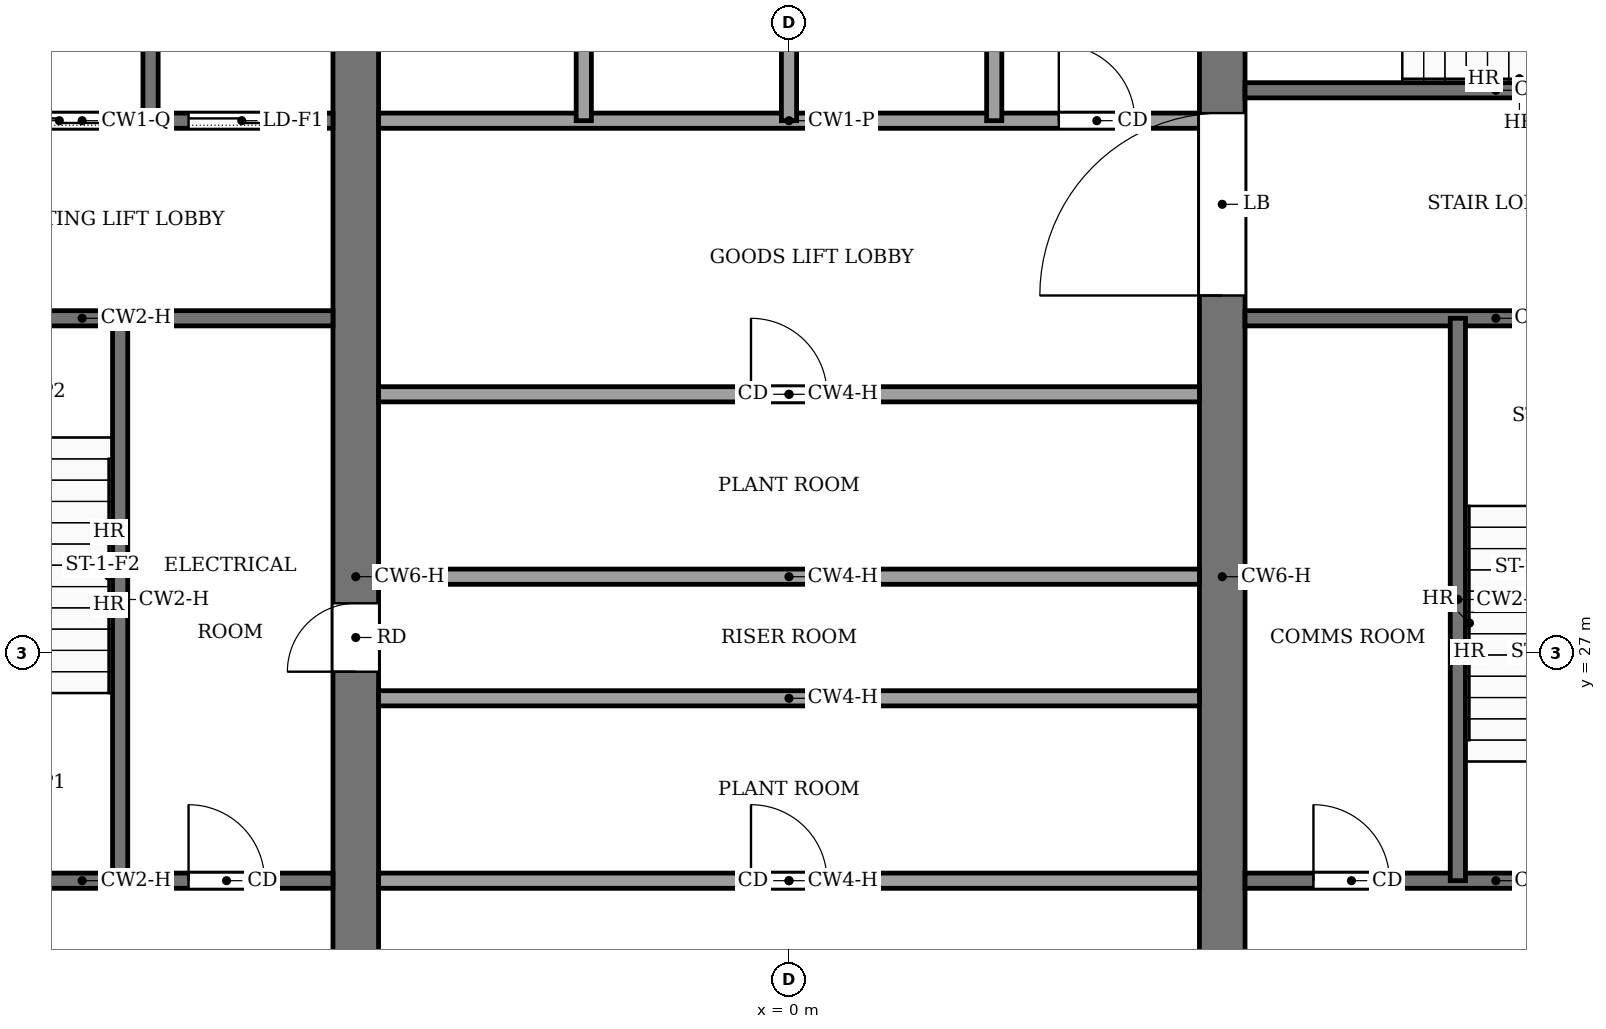
"""IFC4 building model, lengths in metres.
Left out: names, types, materials, properties, quantities, classifications, styles, units other than length and angle.
Written with IfcOpenShell. Run it as: python <this file> out.ifc"""

import sys

from ifc_helpers import new_model, si_unit, direction, frame, frame_2d, origin, place, context, subcontext, project, spatial, rectangle, extrude, element, fill, save


model = new_model("IFC4")
c1 = context("Model", 3, precision=1e-05, world=origin(), true_north=direction((0.0, 1.0)))
c2 = subcontext(c1, "Body", "Model", "MODEL_VIEW")
j1 = project(units=[si_unit("LENGTHUNIT", "METRE"), si_unit("PLANEANGLEUNIT", "RADIAN")], contexts=[c1])
p1 = place(None, origin())
s1 = spatial("IfcSite", under=j1, at=p1, CompositionType="ELEMENT")
p2 = place(p1, origin())
s2 = spatial("IfcBuilding", under=s1, at=p2, CompositionType="ELEMENT")
p3 = place(p2, frame((0.0, 0.0, 340.5)))
s3 = spatial("IfcBuildingStorey", under=s2, at=p3, CompositionType="ELEMENT", Elevation=340.5)
p4 = place(p3, frame((-5.7, 18.4, -0.15), z_axis=(0.0, 0.0, 1.0), x_axis=(0.0, 1.0, 0.0)))
e1 = element("IfcWall", 1, at=p4, inside=s3, PredefinedType="SHEAR", context=c2, shape_type="SweptSolid", body=[
    extrude(rectangle(XDim=19.2, YDim=0.6, at=frame_2d((9.6, 0.0))), origin(), (0.0, 0.0, 1.0), 9.0),
])
p5 = place(p4, frame((8.35, 0.0, 0.15)))
e2 = element("IfcOpeningElement", 2, at=p5, cuts=e1, PredefinedType="OPENING", context=c2, shape_type="SweptSolid", body=[
    extrude(rectangle(XDim=0.9, YDim=2.1, at=frame_2d((0.45, 1.05))), frame((0.0, 0.31, 0.0), z_axis=(0.0, -1.0, 0.0), x_axis=(1.0, 0.0, 0.0)), (0.0, 0.0, 1.0), 0.62),
])
p6 = place(p3, frame((5.7, 18.4, -0.15), z_axis=(0.0, 0.0, 1.0), x_axis=(0.0, 1.0, 0.0)))
e3 = element("IfcWall", 3, at=p6, inside=s3, PredefinedType="SHEAR", context=c2, shape_type="SweptSolid", body=[
    extrude(rectangle(XDim=19.2, YDim=0.6, at=frame_2d((9.6, 0.0))), origin(), (0.0, 0.0, 1.0), 9.0),
])
p7 = place(p6, frame((13.3, 0.0, 0.15)))
e4 = element("IfcOpeningElement", 4, at=p7, cuts=e3, PredefinedType="OPENING", context=c2, shape_type="SweptSolid", body=[
    extrude(rectangle(XDim=2.4, YDim=2.4, at=frame_2d((1.2, 1.2))), frame((0.0, 0.31, 0.0), z_axis=(0.0, -1.0, 0.0), x_axis=(1.0, 0.0, 0.0)), (0.0, 0.0, 1.0), 0.62),
])
p8 = place(p3, frame((-12.6, 24.0, 0.0), z_axis=(0.0, 0.0, 1.0), x_axis=(1.0, 0.0, 0.0)))
e5 = element("IfcWall", 5, at=p8, inside=s3, PredefinedType="PARTITIONING", context=c2, shape_type="SweptSolid", body=[
    extrude(rectangle(XDim=6.6, YDim=0.2, at=frame_2d((3.3, 0.0))), origin(), (0.0, 0.0, 1.0), 8.85),
])
p9 = place(p8, frame((4.7, 0.0, 0.0)))
e6 = element("IfcOpeningElement", 6, at=p9, cuts=e5, PredefinedType="OPENING", context=c2, shape_type="SweptSolid", body=[
    extrude(rectangle(XDim=1.0, YDim=2.1, at=frame_2d((0.5, 1.05))), frame((0.0, 0.11, 0.0), z_axis=(0.0, -1.0, 0.0), x_axis=(1.0, 0.0, 0.0)), (0.0, 0.0, 1.0), 0.22),
])
p10 = place(p3, frame((-5.4, 24.0, 0.0), z_axis=(0.0, 0.0, 1.0), x_axis=(1.0, 0.0, 0.0)))
e7 = element("IfcWall", 7, at=p10, inside=s3, PredefinedType="PARTITIONING", context=c2, shape_type="SweptSolid", body=[
    extrude(rectangle(XDim=10.8, YDim=0.2, at=frame_2d((5.4, 0.0))), origin(), (0.0, 0.0, 1.0), 8.85),
])
p11 = place(p10, frame((4.9, 0.0, 0.0)))
e8 = element("IfcOpeningElement", 8, at=p11, cuts=e7, PredefinedType="OPENING", context=c2, shape_type="SweptSolid", body=[
    extrude(rectangle(XDim=1.0, YDim=2.1, at=frame_2d((0.5, 1.05))), frame((0.0, 0.11, 0.0), z_axis=(0.0, -1.0, 0.0), x_axis=(1.0, 0.0, 0.0)), (0.0, 0.0, 1.0), 0.22),
])
p12 = place(p3, frame((6.0, 24.0, 0.0), z_axis=(0.0, 0.0, 1.0), x_axis=(1.0, 0.0, 0.0)))
e9 = element("IfcWall", 9, at=p12, inside=s3, PredefinedType="PARTITIONING", context=c2, shape_type="SweptSolid", body=[
    extrude(rectangle(XDim=6.6, YDim=0.2, at=frame_2d((3.3, 0.0))), origin(), (0.0, 0.0, 1.0), 8.85),
])
p13 = place(p12, frame((0.9, 0.0, 0.0)))
e10 = element("IfcOpeningElement", 10, at=p13, cuts=e9, PredefinedType="OPENING", context=c2, shape_type="SweptSolid", body=[
    extrude(rectangle(XDim=1.0, YDim=2.1, at=frame_2d((0.5, 1.05))), frame((0.0, 0.11, 0.0), z_axis=(0.0, -1.0, 0.0), x_axis=(1.0, 0.0, 0.0)), (0.0, 0.0, 1.0), 0.22),
])
p14 = place(p12, frame((4.4, 0.0, 0.0)))
e11 = element("IfcOpeningElement", 11, at=p14, cuts=e9, PredefinedType="OPENING", context=c2, shape_type="SweptSolid", body=[
    extrude(rectangle(XDim=1.2, YDim=2.2, at=frame_2d((0.6, 1.1))), frame((0.0, 0.11, 0.0), z_axis=(0.0, -1.0, 0.0), x_axis=(1.0, 0.0, 0.0)), (0.0, 0.0, 1.0), 0.22),
])
for number, where, z_axis, x_axis in (
    (12, (-5.4, 26.4, 0.0), (0.0, 0.0, 1.0), (1.0, 0.0, 0.0)),
    (13, (-5.4, 28.0, 0.0), (0.0, 0.0, 1.0), (1.0, 0.0, 0.0)),
):
    element("IfcWall", number, at=place(p3, frame(where, z_axis=z_axis, x_axis=x_axis)), inside=s3, PredefinedType="PARTITIONING", context=c2, shape_type="SweptSolid", body=[
        extrude(rectangle(XDim=10.8, YDim=0.2, at=frame_2d((5.4, 0.0))), origin(), (0.0, 0.0, 1.0), 8.85),
    ])
p15 = place(p3, frame((-5.4, 30.4, 0.0), z_axis=(0.0, 0.0, 1.0), x_axis=(1.0, 0.0, 0.0)))
e14 = element("IfcWall", 14, at=p15, inside=s3, PredefinedType="PARTITIONING", context=c2, shape_type="SweptSolid", body=[
    extrude(rectangle(XDim=10.8, YDim=0.2, at=frame_2d((5.4, 0.0))), origin(), (0.0, 0.0, 1.0), 8.85),
])
p16 = place(p15, frame((4.9, 0.0, 0.0)))
e15 = element("IfcOpeningElement", 15, at=p16, cuts=e14, PredefinedType="OPENING", context=c2, shape_type="SweptSolid", body=[
    extrude(rectangle(XDim=1.0, YDim=2.1, at=frame_2d((0.5, 1.05))), frame((0.0, 0.11, 0.0), z_axis=(0.0, -1.0, 0.0), x_axis=(1.0, 0.0, 0.0)), (0.0, 0.0, 1.0), 0.22),
])
p17 = place(p3, frame((-12.6, 31.4, 0.0), z_axis=(0.0, 0.0, 1.0), x_axis=(1.0, 0.0, 0.0)))
e16 = element("IfcWall", 16, at=p17, inside=s3, PredefinedType="PARTITIONING", context=c2, shape_type="SweptSolid", body=[
    extrude(rectangle(XDim=6.6, YDim=0.2, at=frame_2d((3.3, 0.0))), origin(), (0.0, 0.0, 1.0), 8.85),
])
p18 = place(p17, frame((1.0, 0.0, 0.0)))
e17 = element("IfcOpeningElement", 17, at=p18, cuts=e16, PredefinedType="OPENING", context=c2, shape_type="SweptSolid", body=[
    extrude(rectangle(XDim=1.2, YDim=2.2, at=frame_2d((0.6, 1.1))), frame((0.0, 0.11, 0.0), z_axis=(0.0, -1.0, 0.0), x_axis=(1.0, 0.0, 0.0)), (0.0, 0.0, 1.0), 0.22),
])
p19 = place(p3, frame((6.0, 31.4, 0.0), z_axis=(0.0, 0.0, 1.0), x_axis=(1.0, 0.0, 0.0)))
e18 = element("IfcWall", 18, at=p19, inside=s3, PredefinedType="PARTITIONING", context=c2, shape_type="SweptSolid", body=[
    extrude(rectangle(XDim=6.6, YDim=0.2, at=frame_2d((3.3, 0.0))), origin(), (0.0, 0.0, 1.0), 8.85),
])
p20 = place(p3, frame((-12.6, 34.0, 0.0), z_axis=(0.0, 0.0, 1.0), x_axis=(1.0, 0.0, 0.0)))
e19 = element("IfcWall", 19, at=p20, inside=s3, PredefinedType="PARTITIONING", context=c2, shape_type="SweptSolid", body=[
    extrude(rectangle(XDim=6.6, YDim=0.2, at=frame_2d((3.3, 0.0))), origin(), (0.0, 0.0, 1.0), 8.85),
])
p21 = place(p20, frame((4.7, 0.0, 0.0)))
e20 = element("IfcOpeningElement", 20, at=p21, cuts=e19, PredefinedType="OPENING", context=c2, shape_type="SweptSolid", body=[
    extrude(rectangle(XDim=1.4, YDim=2.2, at=frame_2d((0.7, 1.1))), frame((0.0, 0.11, 0.0), z_axis=(0.0, -1.0, 0.0), x_axis=(1.0, 0.0, 0.0)), (0.0, 0.0, 1.0), 0.22),
])
p22 = place(p20, frame((2.3, 0.0, 0.0)))
e21 = element("IfcOpeningElement", 21, at=p22, cuts=e19, PredefinedType="OPENING", context=c2, shape_type="SweptSolid", body=[
    extrude(rectangle(XDim=1.4, YDim=2.2, at=frame_2d((0.7, 1.1))), frame((0.0, 0.11, 0.0), z_axis=(0.0, -1.0, 0.0), x_axis=(1.0, 0.0, 0.0)), (0.0, 0.0, 1.0), 0.22),
])
p23 = place(p20, frame((0.45, 0.0, 0.0)))
e22 = element("IfcOpeningElement", 22, at=p23, cuts=e19, PredefinedType="OPENING", context=c2, shape_type="SweptSolid", body=[
    extrude(rectangle(XDim=0.9, YDim=2.1, at=frame_2d((0.45, 1.05))), frame((0.0, 0.11, 0.0), z_axis=(0.0, -1.0, 0.0), x_axis=(1.0, 0.0, 0.0)), (0.0, 0.0, 1.0), 0.22),
])
p24 = place(p3, frame((-5.4, 34.0, 0.0), z_axis=(0.0, 0.0, 1.0), x_axis=(1.0, 0.0, 0.0)))
e23 = element("IfcWall", 23, at=p24, inside=s3, PredefinedType="PARTITIONING", context=c2, shape_type="SweptSolid", body=[
    extrude(rectangle(XDim=10.8, YDim=0.2, at=frame_2d((5.4, 0.0))), origin(), (0.0, 0.0, 1.0), 8.85),
])
p25 = place(p24, frame((8.95, 0.0, 0.0)))
e24 = element("IfcOpeningElement", 24, at=p25, cuts=e23, PredefinedType="OPENING", context=c2, shape_type="SweptSolid", body=[
    extrude(rectangle(XDim=1.0, YDim=2.1, at=frame_2d((0.5, 1.05))), frame((0.0, 0.11, 0.0), z_axis=(0.0, -1.0, 0.0), x_axis=(1.0, 0.0, 0.0)), (0.0, 0.0, 1.0), 0.22),
])
p26 = place(p3, frame((6.0, 34.4, 0.0), z_axis=(0.0, 0.0, 1.0), x_axis=(1.0, 0.0, 0.0)))
e25 = element("IfcWall", 25, at=p26, inside=s3, PredefinedType="PARTITIONING", context=c2, shape_type="SweptSolid", body=[
    extrude(rectangle(XDim=6.6, YDim=0.2, at=frame_2d((3.3, 0.0))), origin(), (0.0, 0.0, 1.0), 8.85),
])
p27 = place(p26, frame((4.8, 0.0, 0.0)))
e26 = element("IfcOpeningElement", 26, at=p27, cuts=e25, PredefinedType="OPENING", context=c2, shape_type="SweptSolid", body=[
    extrude(rectangle(XDim=1.2, YDim=2.2, at=frame_2d((0.6, 1.1))), frame((0.0, 0.11, 0.0), z_axis=(0.0, -1.0, 0.0), x_axis=(1.0, 0.0, 0.0)), (0.0, 0.0, 1.0), 0.22),
])
p28 = place(p3, frame((-8.8, 24.0, 0.0), z_axis=(0.0, 0.0, 1.0), x_axis=(0.0, 1.0, 0.0)))
e27 = element("IfcWall", 27, at=p28, inside=s3, PredefinedType="PARTITIONING", context=c2, shape_type="SweptSolid", body=[
    extrude(rectangle(XDim=7.4, YDim=0.2, at=frame_2d((3.7, 0.0))), origin(), (0.0, 0.0, 1.0), 8.85),
])
for number, where, z_axis, x_axis in (
    (28, (-8.4, 34.0, 0.0), (0.0, 0.0, 1.0), (0.0, 1.0, 0.0)),
    (29, (-2.7, 34.0, 0.0), (0.0, 0.0, 1.0), (0.0, 1.0, 0.0)),
    (30, (0.0, 34.0, 0.0), (0.0, 0.0, 1.0), (0.0, 1.0, 0.0)),
    (31, (2.7, 34.0, 0.0), (0.0, 0.0, 1.0), (0.0, 1.0, 0.0)),
):
    element("IfcWall", number, at=place(p3, frame(where, z_axis=z_axis, x_axis=x_axis)), inside=s3, PredefinedType="PARTITIONING", context=c2, shape_type="SweptSolid", body=[
        extrude(rectangle(XDim=3.6, YDim=0.2, at=frame_2d((1.8, 0.0))), origin(), (0.0, 0.0, 1.0), 8.85),
    ])
p29 = place(p3, frame((8.8, 24.0, 0.0), z_axis=(0.0, 0.0, 1.0), x_axis=(0.0, 1.0, 0.0)))
e32 = element("IfcWall", 32, at=p29, inside=s3, PredefinedType="PARTITIONING", context=c2, shape_type="SweptSolid", body=[
    extrude(rectangle(XDim=7.4, YDim=0.2, at=frame_2d((3.7, 0.0))), origin(), (0.0, 0.0, 1.0), 8.85),
])
p30 = place(p21, origin())
e33 = element("IfcDoor", 33, at=p30, inside=s3, OperationType="SLIDING_TO_LEFT", PredefinedType="DOOR", context=c2, shape_type="SweptSolid", body=[
    extrude(rectangle(XDim=1.4, YDim=2.2, at=frame_2d((0.7, 1.1))), frame((0.0, 0.025, 0.0), z_axis=(0.0, -1.0, 0.0), x_axis=(1.0, 0.0, 0.0)), (0.0, 0.0, 1.0), 0.05),
])
fill(e20, e33)
p31 = place(p22, origin())
e34 = element("IfcDoor", 34, at=p31, inside=s3, OperationType="SLIDING_TO_LEFT", PredefinedType="DOOR", context=c2, shape_type="SweptSolid", body=[
    extrude(rectangle(XDim=1.4, YDim=2.2, at=frame_2d((0.7, 1.1))), frame((0.0, 0.025, 0.0), z_axis=(0.0, -1.0, 0.0), x_axis=(1.0, 0.0, 0.0)), (0.0, 0.0, 1.0), 0.05),
])
fill(e21, e34)
p32 = place(p11, origin())
e35 = element("IfcDoor", 35, at=p32, inside=s3, OperationType="SINGLE_SWING_LEFT", PredefinedType="DOOR", context=c2, shape_type="SweptSolid", body=[
    extrude(rectangle(XDim=1.0, YDim=2.1, at=frame_2d((0.5, 1.05))), frame((0.0, 0.025, 0.0), z_axis=(0.0, -1.0, 0.0), x_axis=(1.0, 0.0, 0.0)), (0.0, 0.0, 1.0), 0.05),
])
fill(e8, e35)
p33 = place(p16, origin())
e36 = element("IfcDoor", 36, at=p33, inside=s3, OperationType="SINGLE_SWING_RIGHT", PredefinedType="DOOR", context=c2, shape_type="SweptSolid", body=[
    extrude(rectangle(XDim=1.0, YDim=2.1, at=frame_2d((0.5, 1.05))), frame((0.0, 0.025, 0.0), z_axis=(0.0, -1.0, 0.0), x_axis=(1.0, 0.0, 0.0)), (0.0, 0.0, 1.0), 0.05),
])
fill(e15, e36)
p34 = place(p9, origin())
e37 = element("IfcDoor", 37, at=p34, inside=s3, OperationType="SINGLE_SWING_LEFT", PredefinedType="DOOR", context=c2, shape_type="SweptSolid", body=[
    extrude(rectangle(XDim=1.0, YDim=2.1, at=frame_2d((0.5, 1.05))), frame((0.0, 0.025, 0.0), z_axis=(0.0, -1.0, 0.0), x_axis=(1.0, 0.0, 0.0)), (0.0, 0.0, 1.0), 0.05),
])
fill(e6, e37)
p35 = place(p13, origin())
e38 = element("IfcDoor", 38, at=p35, inside=s3, OperationType="SINGLE_SWING_RIGHT", PredefinedType="DOOR", context=c2, shape_type="SweptSolid", body=[
    extrude(rectangle(XDim=1.0, YDim=2.1, at=frame_2d((0.5, 1.05))), frame((0.0, 0.025, 0.0), z_axis=(0.0, -1.0, 0.0), x_axis=(1.0, 0.0, 0.0)), (0.0, 0.0, 1.0), 0.05),
])
fill(e10, e38)
p36 = place(p25, origin())
e39 = element("IfcDoor", 39, at=p36, inside=s3, OperationType="SINGLE_SWING_LEFT", PredefinedType="DOOR", context=c2, shape_type="SweptSolid", body=[
    extrude(rectangle(XDim=1.0, YDim=2.1, at=frame_2d((0.5, 1.05))), frame((0.0, 0.025, 0.0), z_axis=(0.0, -1.0, 0.0), x_axis=(1.0, 0.0, 0.0)), (0.0, 0.0, 1.0), 0.05),
])
fill(e24, e39)
p37 = place(p5, origin())
e40 = element("IfcDoor", 40, at=p37, inside=s3, OperationType="SINGLE_SWING_LEFT", PredefinedType="DOOR", context=c2, shape_type="SweptSolid", body=[
    extrude(rectangle(XDim=0.9, YDim=2.1, at=frame_2d((0.45, 1.05))), frame((0.0, 0.025, 0.0), z_axis=(0.0, -1.0, 0.0), x_axis=(1.0, 0.0, 0.0)), (0.0, 0.0, 1.0), 0.05),
])
fill(e2, e40)
p38 = place(p7, origin())
e41 = element("IfcDoor", 41, at=p38, inside=s3, OperationType="DOUBLE_DOOR_SINGLE_SWING", PredefinedType="DOOR", context=c2, shape_type="SweptSolid", body=[
    extrude(rectangle(XDim=2.4, YDim=2.4, at=frame_2d((1.2, 1.2))), frame((0.0, 0.025, 0.0), z_axis=(0.0, -1.0, 0.0), x_axis=(1.0, 0.0, 0.0)), (0.0, 0.0, 1.0), 0.05),
])
fill(e4, e41)
save(model, sys.argv[1])
